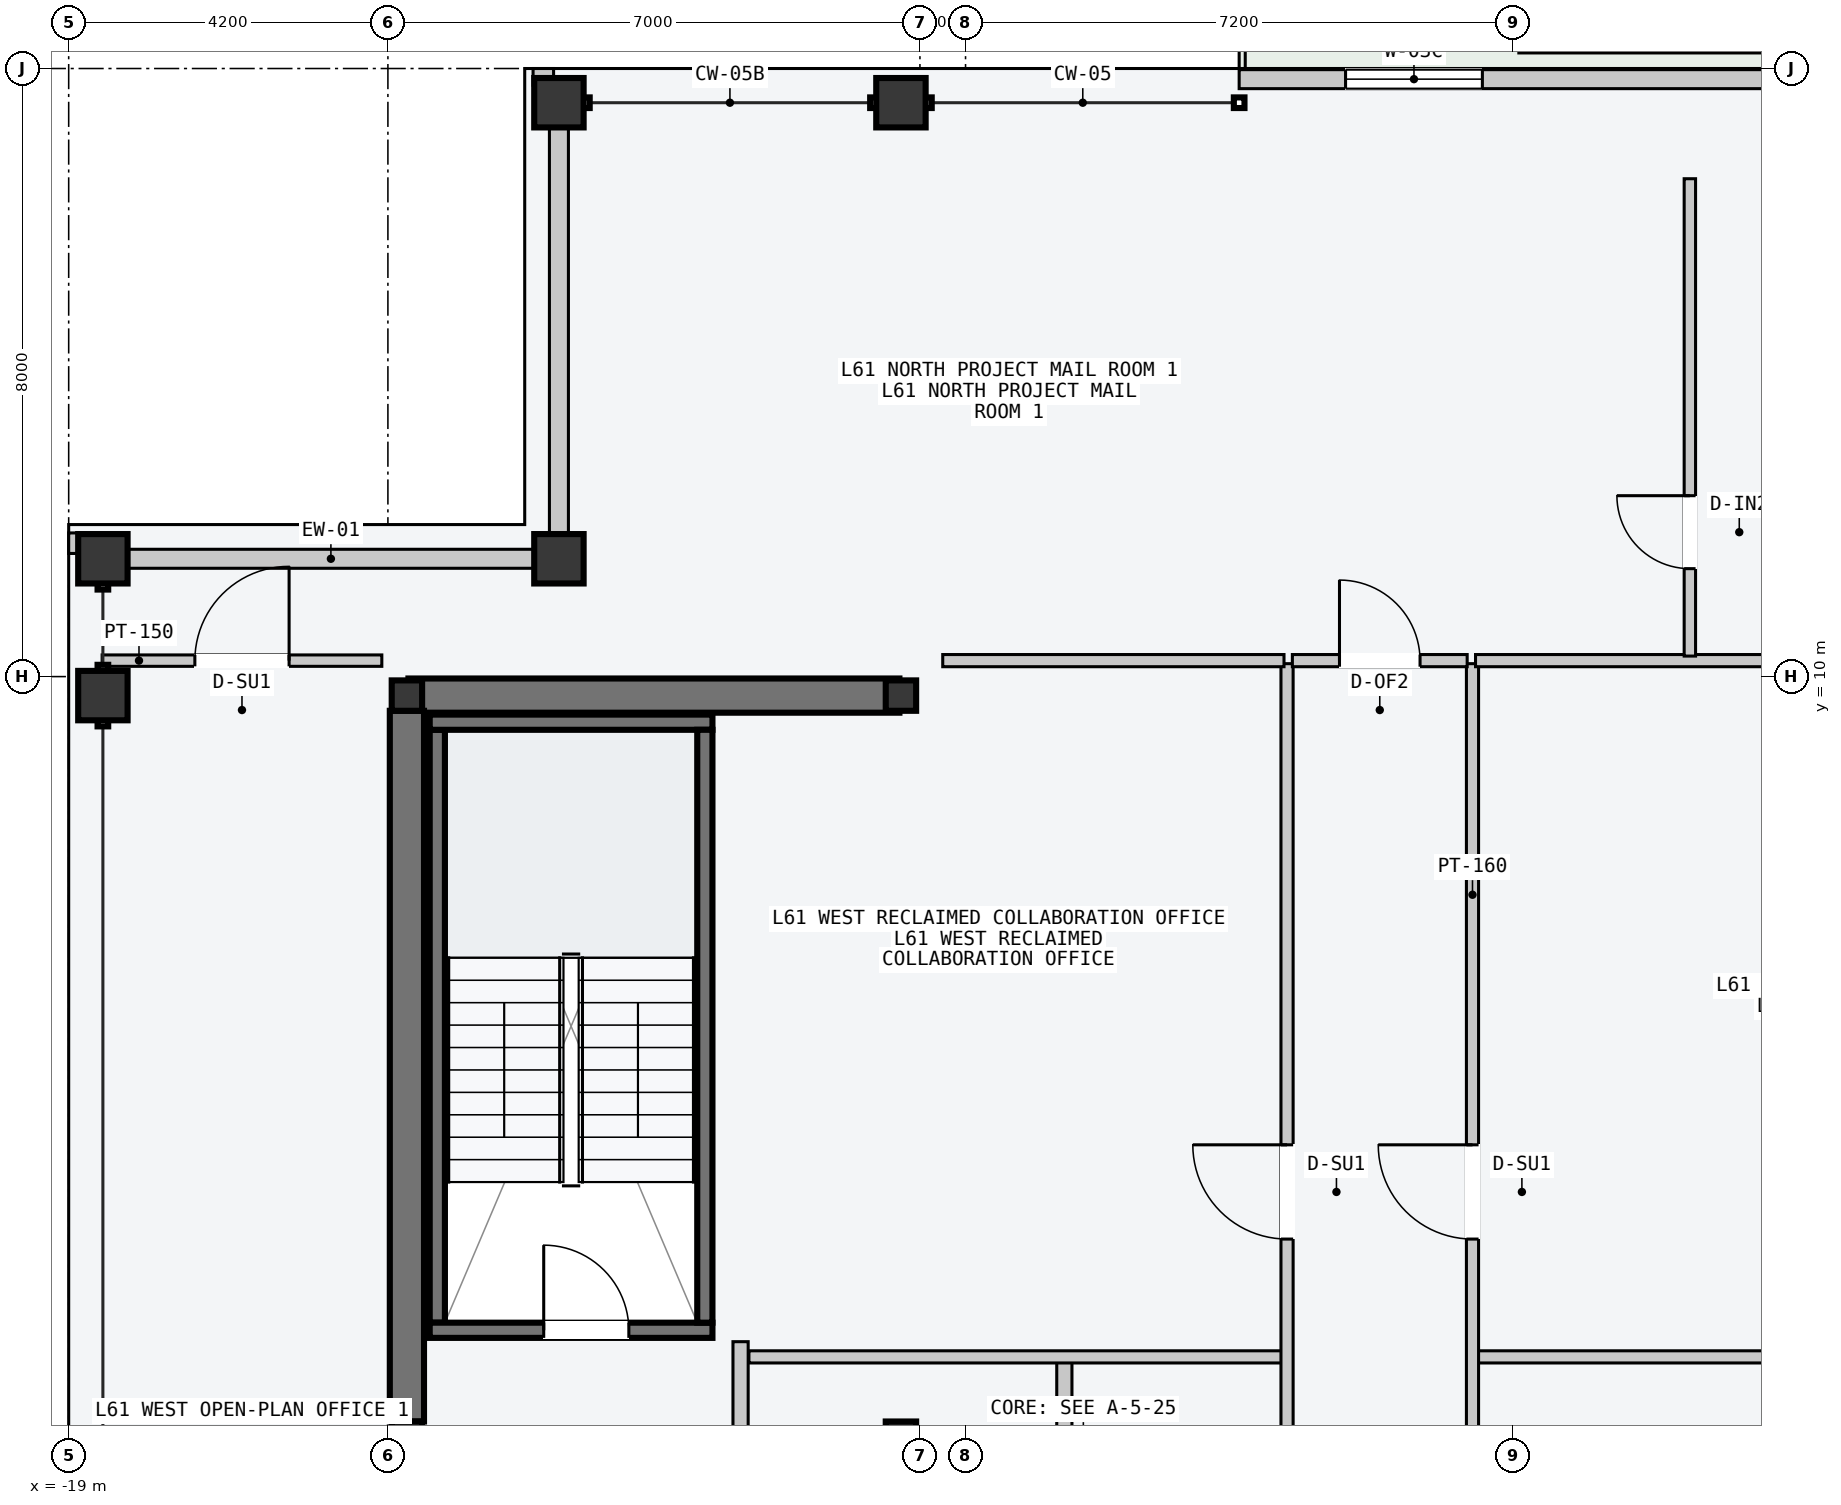
"""IFC4 building model, lengths in metres.
Left out: names, types, materials, properties, quantities, classifications, styles, units other than length and angle.
Written with IfcOpenShell. Run it as: python <this file> out.ifc"""

import sys

from ifc_helpers import new_model, si_unit, direction, frame, frame_2d, origin, origin_2d, place, context, subcontext, project, spatial, rectangle, hollow_rectangle, i_section, extrude, element, fill, save


model = new_model("IFC4")
c1 = context("Model", 3, precision=1e-05, world=origin(), true_north=direction((0.0, 1.0)))
c2 = subcontext(c1, "Body", "Model", "MODEL_VIEW")
j1 = project(units=[si_unit("LENGTHUNIT", "METRE"), si_unit("PLANEANGLEUNIT", "RADIAN")], contexts=[c1])
p1 = place(None, origin())
s1 = spatial("IfcSite", under=j1, at=p1, CompositionType="ELEMENT")
p2 = place(p1, origin())
s2 = spatial("IfcBuilding", under=s1, at=p2, CompositionType="ELEMENT")
p3 = place(p2, frame((0.0, 0.0, 232.8)))
s3 = spatial("IfcBuildingStorey", under=s2, at=p3, CompositionType="ELEMENT", Elevation=232.8)
p4 = place(p3, frame((-14.53, 9.75, -0.2), z_axis=(0.0, 0.0, 1.0), x_axis=(1.0, 0.0, 0.0)))
e1 = element("IfcWall", 1, at=p4, inside=s3, PredefinedType="SHEAR", context=c2, shape_type="SweptSolid", body=[
    extrude(rectangle(XDim=6.46, YDim=0.45, at=frame_2d((3.23, 0.0))), origin(), (0.0, 0.0, 1.0), 3.6),
])
p5 = place(p3, frame((-14.55, 0.2, -0.2), z_axis=(0.0, 0.0, 1.0), x_axis=(0.0, 1.0, 0.0)))
e2 = element("IfcWall", 2, at=p5, inside=s3, PredefinedType="SHEAR", context=c2, shape_type="SweptSolid", body=[
    extrude(rectangle(XDim=9.35, YDim=0.45, at=frame_2d((4.675, 0.0))), origin(), (0.0, 0.0, 1.0), 3.6),
])
p6 = place(p3, frame((-14.15, 1.5, -0.2), z_axis=(0.0, 0.0, 1.0), x_axis=(0.0, 1.0, 0.0)))
e3 = element("IfcWall", 3, at=p6, inside=s3, PredefinedType="SOLIDWALL", context=c2, shape_type="SweptSolid", body=[
    extrude(rectangle(XDim=7.8, YDim=0.2, at=frame_2d((3.9, 0.0))), origin(), (0.0, 0.0, 1.0), 3.6),
])
p7 = place(p3, frame((-14.25, 1.4, -0.2), z_axis=(0.0, 0.0, 1.0), x_axis=(1.0, 0.0, 0.0)))
e4 = element("IfcWall", 4, at=p7, inside=s3, PredefinedType="SOLIDWALL", context=c2, shape_type="SweptSolid", body=[
    extrude(rectangle(XDim=3.72, YDim=0.2, at=frame_2d((1.86, 0.0))), origin(), (0.0, 0.0, 1.0), 3.6),
])
p8 = place(p7, frame((1.5, 0.0, 0.2)))
e5 = element("IfcOpeningElement", 5, at=p8, cuts=e4, PredefinedType="OPENING", context=c2, shape_type="SweptSolid", body=[
    extrude(rectangle(XDim=1.12, YDim=2.18, at=frame_2d((0.56, 1.09))), frame((0.0, 0.11, 0.0), z_axis=(0.0, -1.0, 0.0), x_axis=(1.0, 0.0, 0.0)), (0.0, 0.0, 1.0), 0.22),
])
p9 = place(p3, frame((-14.25, 9.4, -0.2), z_axis=(0.0, 0.0, 1.0), x_axis=(1.0, 0.0, 0.0)))
e6 = element("IfcWall", 6, at=p9, inside=s3, PredefinedType="SOLIDWALL", context=c2, shape_type="SweptSolid", body=[
    extrude(rectangle(XDim=3.72, YDim=0.2, at=frame_2d((1.86, 0.0))), origin(), (0.0, 0.0, 1.0), 3.6),
])
p10 = place(p3, frame((-10.63, 1.5, -0.2), z_axis=(0.0, 0.0, 1.0), x_axis=(0.0, 1.0, 0.0)))
e7 = element("IfcWall", 7, at=p10, inside=s3, PredefinedType="SOLIDWALL", context=c2, shape_type="SweptSolid", body=[
    extrude(rectangle(XDim=7.8, YDim=0.2, at=frame_2d((3.9, 0.0))), origin(), (0.0, 0.0, 1.0), 3.6),
])
for number, where, z_axis, x_axis in (
    (8, (-14.55, 0.0, 0.0), (0.0, 0.0, 1.0), (1.0, 0.0, 0.0)),
    (9, (-14.55, 9.75, 0.0), (0.0, 0.0, 1.0), (1.0, 0.0, 0.0)),
    (10, (-8.05, 0.0, 0.0), (0.0, 0.0, 1.0), (1.0, 0.0, 0.0)),
    (11, (-8.05, 9.75, 0.0), (0.0, 0.0, 1.0), (1.0, 0.0, 0.0)),
):
    element("IfcColumn", number, at=place(p3, frame(where, z_axis=z_axis, x_axis=x_axis)), inside=s3, PredefinedType="COLUMN", context=c2, shape_type="SweptSolid", body=[
        extrude(i_section(OverallWidth=0.4, OverallDepth=0.4, WebThickness=0.013, FlangeThickness=0.021, at=origin_2d()), origin(), (0.0, 0.0, 1.0), 3.6),
    ])
for number, where, z_axis, x_axis in (
    (12, (-12.55, 17.55, 0.0), (0.0, 0.0, 1.0), (1.0, 0.0, 0.0)),
    (13, (-8.05, 17.55, 0.0), (0.0, 0.0, 1.0), (1.0, 0.0, 0.0)),
    (14, (-18.55, 9.75, 0.0), (0.0, 0.0, 1.0), (0.0, 1.0, 0.0)),
    (15, (-18.55, 11.55, 0.0), (0.0, 0.0, 1.0), (0.0, 1.0, 0.0)),
    (16, (-12.55, 11.55, 0.0), (0.0, 0.0, 1.0), (1.0, 0.0, 0.0)),
):
    element("IfcColumn", number, at=place(p3, frame(where, z_axis=z_axis, x_axis=x_axis)), inside=s3, PredefinedType="COLUMN", context=c2, shape_type="SweptSolid", body=[
        extrude(hollow_rectangle(XDim=0.65, YDim=0.65, WallThickness=0.028, at=origin_2d()), origin(), (0.0, 0.0, 1.0), 3.6),
    ])
p11 = place(p3, frame((-3.6, 17.86, 0.0), z_axis=(0.0, 0.0, 1.0), x_axis=(1.0, 0.0, 0.0)))
e17 = element("IfcWall", 17, at=p11, inside=s3, PredefinedType="STANDARD", context=c2, shape_type="SweptSolid", body=[
    extrude(rectangle(XDim=10.8, YDim=0.25, at=frame_2d((5.4, 0.0))), origin(), (0.0, 0.0, 1.0), 3.4),
])
p12 = place(p11, frame((7.4, 0.0, 0.0)))
e18 = element("IfcOpeningElement", 18, at=p12, cuts=e17, PredefinedType="OPENING", context=c2, shape_type="SweptSolid", body=[
    extrude(rectangle(XDim=1.6, YDim=2.2, at=frame_2d((0.8, 1.1))), frame((0.0, 0.135, 0.0), z_axis=(0.0, -1.0, 0.0), x_axis=(1.0, 0.0, 0.0)), (0.0, 0.0, 1.0), 0.27),
])
p13 = place(p11, frame((1.4, 0.0, 0.85)))
e19 = element("IfcOpeningElement", 19, at=p13, cuts=e17, PredefinedType="OPENING", context=c2, shape_type="SweptSolid", body=[
    extrude(rectangle(XDim=1.8, YDim=2.05, at=frame_2d((0.9, 1.025))), frame((0.0, 0.135, 0.0), z_axis=(0.0, -1.0, 0.0), x_axis=(1.0, 0.0, 0.0)), (0.0, 0.0, 1.0), 0.27),
])
for number, where, z_axis, x_axis in (
    (20, (-18.215, 11.55, 0.0), (0.0, 0.0, 1.0), (1.0, 0.0, 0.0)),
    (21, (-12.55, 11.885, 0.0), (0.0, 0.0, 1.0), (0.0, 1.0, 0.0)),
):
    element("IfcWall", number, at=place(p3, frame(where, z_axis=z_axis, x_axis=x_axis)), inside=s3, PredefinedType="STANDARD", context=c2, shape_type="SweptSolid", body=[
        extrude(rectangle(XDim=5.33, YDim=0.25, at=frame_2d((2.665, 0.0))), origin(), (0.0, 0.0, 1.0), 2.85),
    ])
for number, where, z_axis, x_axis in (
    (22, (-12.89, 17.89, 0.0), (0.0, 0.0, 1.0), (1.0, 0.0, 0.0)),
    (23, (-18.89, 11.62, 0.0), (0.0, 0.0, 1.0), (0.0, 1.0, 0.0)),
):
    element("IfcWall", number, at=place(p3, frame(where, z_axis=z_axis, x_axis=x_axis)), inside=s3, PredefinedType="PARAPET", context=c2, shape_type="SweptSolid", body=[
        extrude(rectangle(XDim=0.27, YDim=0.22, at=frame_2d((0.135, 0.0))), origin(), (0.0, 0.0, 1.0), 1.2),
    ])
p14 = place(p3, frame((-5.9, -9.45, 0.0), z_axis=(0.0, 0.0, 1.0), x_axis=(0.0, 1.0, 0.0)))
e24 = element("IfcWall", 24, at=p14, inside=s3, PredefinedType="PARTITIONING", context=c2, shape_type="SweptSolid", body=[
    extrude(rectangle(XDim=10.5, YDim=0.2, at=frame_2d((5.25, 0.0))), origin(), (0.0, 0.0, 1.0), 3.4),
])
p15 = place(p14, frame((3.9, 0.0, 0.0)))
e25 = element("IfcOpeningElement", 25, at=p15, cuts=e24, PredefinedType="OPENING", context=c2, shape_type="SweptSolid", body=[
    extrude(rectangle(XDim=1.5, YDim=2.2, at=frame_2d((0.75, 1.1))), frame((0.0, 0.11, 0.0), z_axis=(0.0, -1.0, 0.0), x_axis=(1.0, 0.0, 0.0)), (0.0, 0.0, 1.0), 0.22),
])
p16 = place(p3, frame((-10.16, -2.55, 0.0), z_axis=(0.0, 0.0, 1.0), x_axis=(0.0, 1.0, 0.0)))
e26 = element("IfcWall", 26, at=p16, inside=s3, PredefinedType="PARTITIONING", context=c2, shape_type="SweptSolid", body=[
    extrude(rectangle(XDim=3.8, YDim=0.2, at=frame_2d((1.9, 0.0))), origin(), (0.0, 0.0, 1.0), 3.4),
])
p17 = place(p16, frame((1.3, 0.0, 0.0)))
e27 = element("IfcOpeningElement", 27, at=p17, cuts=e26, PredefinedType="OPENING", context=c2, shape_type="SweptSolid", body=[
    extrude(rectangle(XDim=1.1, YDim=2.15, at=frame_2d((0.55, 1.075))), frame((0.0, 0.11, 0.0), z_axis=(0.0, -1.0, 0.0), x_axis=(1.0, 0.0, 0.0)), (0.0, 0.0, 1.0), 0.22),
])
p18 = place(p3, frame((-10.05, 1.05, 0.0), z_axis=(0.0, 0.0, 1.0), x_axis=(1.0, 0.0, 0.0)))
e28 = element("IfcWall", 28, at=p18, inside=s3, PredefinedType="PARTITIONING", context=c2, shape_type="SweptSolid", body=[
    extrude(rectangle(XDim=7.04, YDim=0.16, at=frame_2d((3.52, 0.0))), origin(), (0.0, 0.0, 1.0), 3.4),
])
p19 = place(p3, frame((-2.97, -3.5, 0.0), z_axis=(0.0, 0.0, 1.0), x_axis=(0.0, 1.0, 0.0)))
e29 = element("IfcWall", 29, at=p19, inside=s3, PredefinedType="PARTITIONING", context=c2, shape_type="SweptSolid", body=[
    extrude(rectangle(XDim=13.67, YDim=0.16, at=frame_2d((6.835, 0.0))), origin(), (0.0, 0.0, 1.0), 3.4),
])
p20 = place(p19, frame((6.1, 0.0, 0.0)))
e30 = element("IfcOpeningElement", 30, at=p20, cuts=e29, PredefinedType="OPENING", context=c2, shape_type="SweptSolid", body=[
    extrude(rectangle(XDim=1.24, YDim=2.24, at=frame_2d((0.62, 1.12))), frame((0.0, 0.09, 0.0), z_axis=(0.0, -1.0, 0.0), x_axis=(1.0, 0.0, 0.0)), (0.0, 0.0, 1.0), 0.18),
])
p21 = place(p19, frame((1.6, 0.0, 0.0)))
e31 = element("IfcOpeningElement", 31, at=p21, cuts=e29, PredefinedType="OPENING", context=c2, shape_type="SweptSolid", body=[
    extrude(rectangle(XDim=0.96, YDim=2.18, at=frame_2d((0.48, 1.09))), frame((0.0, 0.09, 0.0), z_axis=(0.0, -1.0, 0.0), x_axis=(1.0, 0.0, 0.0)), (0.0, 0.0, 1.0), 0.18),
])
p22 = place(p3, frame((-7.5, 10.21, 0.0), z_axis=(0.0, 0.0, 1.0), x_axis=(1.0, 0.0, 0.0)))
e32 = element("IfcWall", 32, at=p22, inside=s3, PredefinedType="PARTITIONING", context=c2, shape_type="SweptSolid", body=[
    extrude(rectangle(XDim=4.49, YDim=0.16, at=frame_2d((2.245, 0.0))), origin(), (0.0, 0.0, 1.0), 3.4),
])
p23 = place(p3, frame((-0.49, 1.05, 0.0), z_axis=(0.0, 0.0, 1.0), x_axis=(1.0, 0.0, 0.0)))
e33 = element("IfcWall", 33, at=p23, inside=s3, PredefinedType="PARTITIONING", context=c2, shape_type="SweptSolid", body=[
    extrude(rectangle(XDim=10.55, YDim=0.16, at=frame_2d((5.275, 0.0))), origin(), (0.0, 0.0, 1.0), 3.4),
])
p24 = place(p3, frame((-0.53, -3.5, 0.0), z_axis=(0.0, 0.0, 1.0), x_axis=(0.0, 1.0, 0.0)))
e34 = element("IfcWall", 34, at=p24, inside=s3, PredefinedType="PARTITIONING", context=c2, shape_type="SweptSolid", body=[
    extrude(rectangle(XDim=13.67, YDim=0.16, at=frame_2d((6.835, 0.0))), origin(), (0.0, 0.0, 1.0), 3.4),
])
p25 = place(p24, frame((6.1, 0.0, 0.0)))
e35 = element("IfcOpeningElement", 35, at=p25, cuts=e34, PredefinedType="OPENING", context=c2, shape_type="SweptSolid", body=[
    extrude(rectangle(XDim=1.24, YDim=2.24, at=frame_2d((0.62, 1.12))), frame((0.0, 0.09, 0.0), z_axis=(0.0, -1.0, 0.0), x_axis=(1.0, 0.0, 0.0)), (0.0, 0.0, 1.0), 0.18),
])
p26 = place(p24, frame((1.6, 0.0, 0.0)))
e36 = element("IfcOpeningElement", 36, at=p26, cuts=e34, PredefinedType="OPENING", context=c2, shape_type="SweptSolid", body=[
    extrude(rectangle(XDim=0.96, YDim=2.18, at=frame_2d((0.48, 1.09))), frame((0.0, 0.09, 0.0), z_axis=(0.0, -1.0, 0.0), x_axis=(1.0, 0.0, 0.0)), (0.0, 0.0, 1.0), 0.18),
])
p27 = place(p3, frame((-0.49, 10.21, 0.0), z_axis=(0.0, 0.0, 1.0), x_axis=(1.0, 0.0, 0.0)))
e37 = element("IfcWall", 37, at=p27, inside=s3, PredefinedType="PARTITIONING", context=c2, shape_type="SweptSolid", body=[
    extrude(rectangle(XDim=7.99, YDim=0.16, at=frame_2d((3.995, 0.0))), origin(), (0.0, 0.0, 1.0), 3.4),
])
p28 = place(p3, frame((2.33, 10.27, 0.0), z_axis=(0.0, 0.0, 1.0), x_axis=(0.0, 1.0, 0.0)))
e38 = element("IfcWall", 38, at=p28, inside=s3, PredefinedType="PARTITIONING", context=c2, shape_type="SweptSolid", body=[
    extrude(rectangle(XDim=6.28, YDim=0.15, at=frame_2d((3.14, 0.0))), origin(), (0.0, 0.0, 1.0), 3.4),
])
p29 = place(p28, frame((1.15, 0.0, 0.0)))
e39 = element("IfcOpeningElement", 39, at=p29, cuts=e38, PredefinedType="OPENING", context=c2, shape_type="SweptSolid", body=[
    extrude(rectangle(XDim=0.96, YDim=2.18, at=frame_2d((0.48, 1.09))), frame((0.0, 0.085, 0.0), z_axis=(0.0, -1.0, 0.0), x_axis=(1.0, 0.0, 0.0)), (0.0, 0.0, 1.0), 0.17),
])
p30 = place(p3, frame((-2.9, 10.21, 0.0), z_axis=(0.0, 0.0, 1.0), x_axis=(1.0, 0.0, 0.0)))
e40 = element("IfcWall", 40, at=p30, inside=s3, PredefinedType="PARTITIONING", context=c2, shape_type="SweptSolid", body=[
    extrude(rectangle(XDim=2.3, YDim=0.16, at=frame_2d((1.15, 0.0))), origin(), (0.0, 0.0, 1.0), 3.4),
])
p31 = place(p30, frame((0.62, 0.0, 0.0)))
e41 = element("IfcOpeningElement", 41, at=p31, cuts=e40, PredefinedType="OPENING", context=c2, shape_type="SweptSolid", body=[
    extrude(rectangle(XDim=1.06, YDim=2.2, at=frame_2d((0.53, 1.1))), frame((0.0, 0.09, 0.0), z_axis=(0.0, -1.0, 0.0), x_axis=(1.0, 0.0, 0.0)), (0.0, 0.0, 1.0), 0.18),
])
p32 = place(p3, frame((-18.56, 10.21, 0.0), z_axis=(0.0, 0.0, 1.0), x_axis=(1.0, 0.0, 0.0)))
e42 = element("IfcWall", 42, at=p32, inside=s3, PredefinedType="PARTITIONING", context=c2, shape_type="SweptSolid", body=[
    extrude(rectangle(XDim=3.68, YDim=0.15, at=frame_2d((1.84, 0.0))), origin(), (0.0, 0.0, 1.0), 3.4),
])
p33 = place(p32, frame((1.22, 0.0, 0.0)))
e43 = element("IfcOpeningElement", 43, at=p33, cuts=e42, PredefinedType="OPENING", context=c2, shape_type="SweptSolid", body=[
    extrude(rectangle(XDim=1.24, YDim=2.24, at=frame_2d((0.62, 1.12))), frame((0.0, 0.085, 0.0), z_axis=(0.0, -1.0, 0.0), x_axis=(1.0, 0.0, 0.0)), (0.0, 0.0, 1.0), 0.17),
])
p34 = place(p8, origin())
e44 = element("IfcDoor", 44, at=p34, inside=s3, OperationType="SINGLE_SWING_LEFT", PredefinedType="DOOR", context=c2, shape_type="SweptSolid", body=[
    extrude(rectangle(XDim=1.12, YDim=2.18, at=frame_2d((0.56, 1.09))), frame((0.0, 0.025, 0.0), z_axis=(0.0, -1.0, 0.0), x_axis=(1.0, 0.0, 0.0)), (0.0, 0.0, 1.0), 0.05),
])
fill(e5, e44)
p35 = place(p13, origin())
e45 = element("IfcWindow", 45, at=p35, inside=s3, PartitioningType="SINGLE_PANEL", PredefinedType="WINDOW", context=c2, shape_type="SweptSolid", body=[
    extrude(rectangle(XDim=1.8, YDim=2.05, at=frame_2d((0.9, 1.025))), frame((0.0, 0.03, 0.0), z_axis=(0.0, -1.0, 0.0), x_axis=(1.0, 0.0, 0.0)), (0.0, 0.0, 1.0), 0.06),
])
fill(e19, e45)
p36 = place(p20, origin())
e46 = element("IfcDoor", 46, at=p36, inside=s3, OperationType="SINGLE_SWING_RIGHT", PredefinedType="DOOR", context=c2, shape_type="SweptSolid", body=[
    extrude(rectangle(XDim=1.24, YDim=2.24, at=frame_2d((0.62, 1.12))), frame((0.0, 0.025, 0.0), z_axis=(0.0, -1.0, 0.0), x_axis=(1.0, 0.0, 0.0)), (0.0, 0.0, 1.0), 0.05),
])
fill(e30, e46)
p37 = place(p25, origin())
e47 = element("IfcDoor", 47, at=p37, inside=s3, OperationType="SINGLE_SWING_RIGHT", PredefinedType="DOOR", context=c2, shape_type="SweptSolid", body=[
    extrude(rectangle(XDim=1.24, YDim=2.24, at=frame_2d((0.62, 1.12))), frame((0.0, 0.025, 0.0), z_axis=(0.0, -1.0, 0.0), x_axis=(1.0, 0.0, 0.0)), (0.0, 0.0, 1.0), 0.05),
])
fill(e35, e47)
p38 = place(p29, origin())
e48 = element("IfcDoor", 48, at=p38, inside=s3, OperationType="SINGLE_SWING_RIGHT", PredefinedType="DOOR", context=c2, shape_type="SweptSolid", body=[
    extrude(rectangle(XDim=0.96, YDim=2.18, at=frame_2d((0.48, 1.09))), frame((0.0, 0.025, 0.0), z_axis=(0.0, -1.0, 0.0), x_axis=(1.0, 0.0, 0.0)), (0.0, 0.0, 1.0), 0.05),
])
fill(e39, e48)
p39 = place(p31, origin())
e49 = element("IfcDoor", 49, at=p39, inside=s3, OperationType="SINGLE_SWING_LEFT", PredefinedType="DOOR", context=c2, shape_type="SweptSolid", body=[
    extrude(rectangle(XDim=1.06, YDim=2.2, at=frame_2d((0.53, 1.1))), frame((0.0, 0.025, 0.0), z_axis=(0.0, -1.0, 0.0), x_axis=(1.0, 0.0, 0.0)), (0.0, 0.0, 1.0), 0.05),
])
fill(e41, e49)
p40 = place(p33, origin())
e50 = element("IfcDoor", 50, at=p40, inside=s3, OperationType="SINGLE_SWING_RIGHT", PredefinedType="DOOR", context=c2, shape_type="SweptSolid", body=[
    extrude(rectangle(XDim=1.24, YDim=2.24, at=frame_2d((0.62, 1.12))), frame((0.0, 0.025, 0.0), z_axis=(0.0, -1.0, 0.0), x_axis=(1.0, 0.0, 0.0)), (0.0, 0.0, 1.0), 0.05),
])
fill(e43, e50)
save(model, sys.argv[1])
